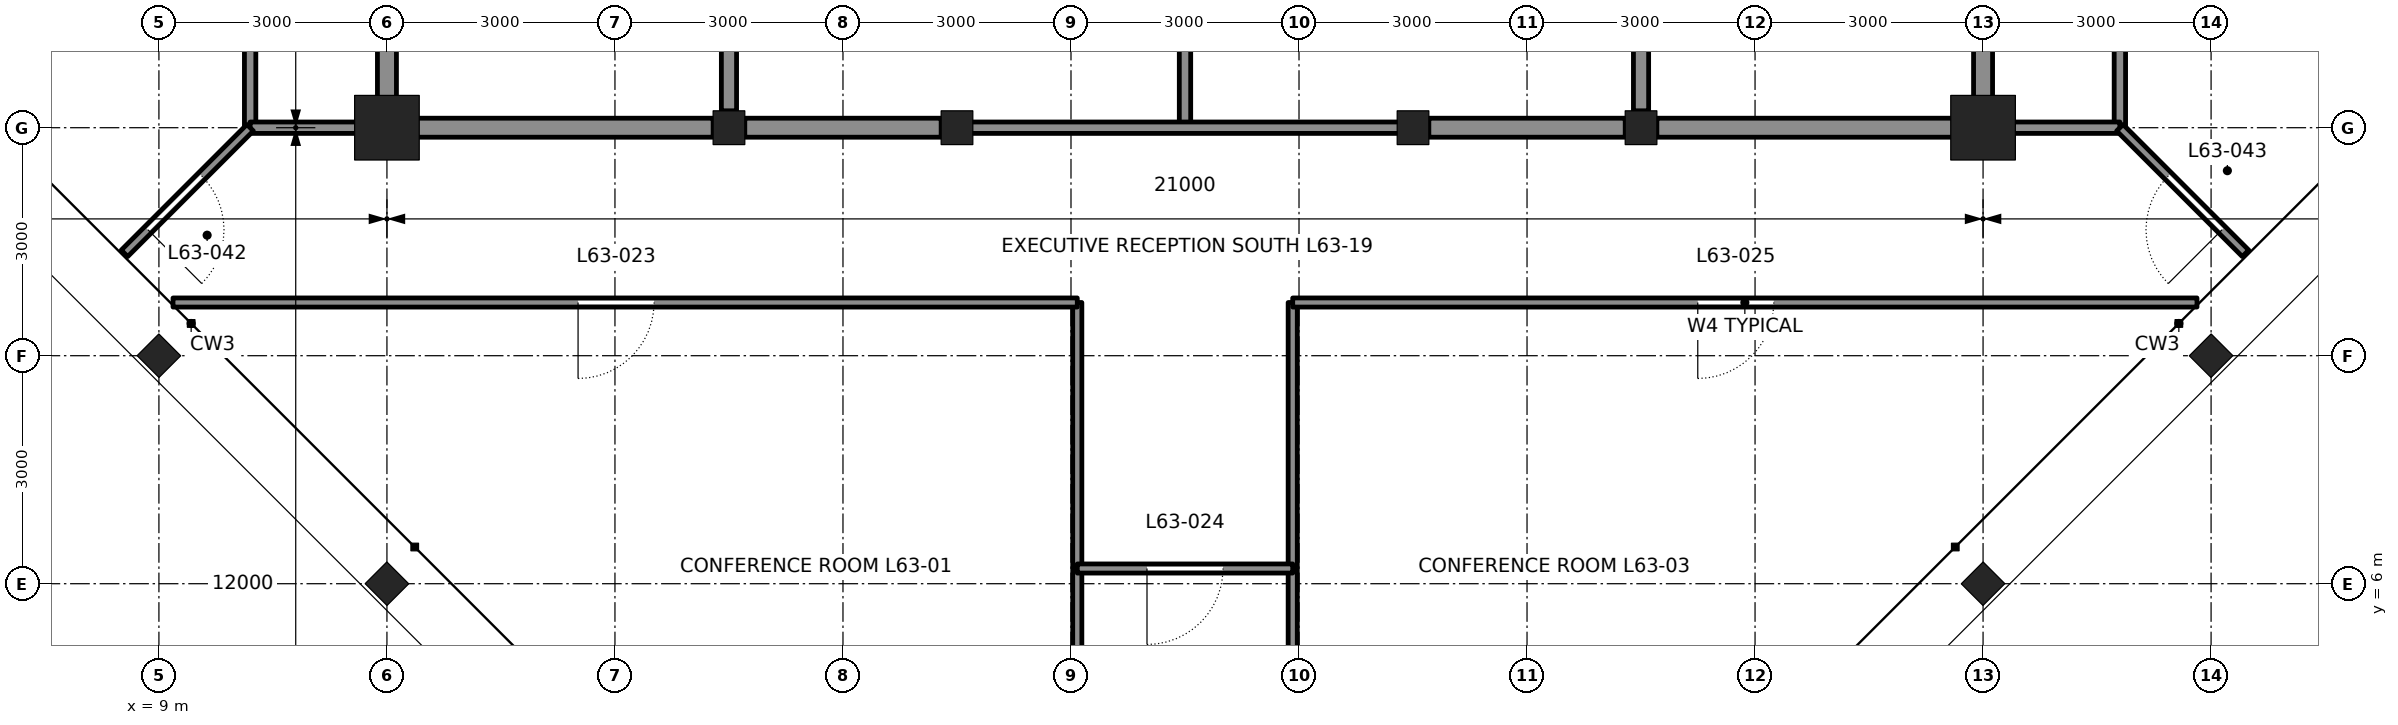
"""IFC4 building model, lengths in metres.
Left out: names, types, materials, properties, quantities, classifications, styles, units other than length and angle.
Written with IfcOpenShell. Run it as: python <this file> out.ifc"""

import sys

from ifc_helpers import new_model, si_unit, direction, frame, frame_2d, origin, origin_2d, place, context, subcontext, project, spatial, rectangle, hollow_rectangle, i_section, extrude, element, fill, save


model = new_model("IFC4")
c1 = context("Model", 3, precision=1e-05, world=origin(), true_north=direction((0.0, 1.0)))
c2 = subcontext(c1, "Body", "Model", "MODEL_VIEW")
j1 = project(units=[si_unit("LENGTHUNIT", "METRE"), si_unit("PLANEANGLEUNIT", "RADIAN")], contexts=[c1])
p1 = place(None, origin())
s1 = spatial("IfcSite", under=j1, at=p1, CompositionType="ELEMENT")
p2 = place(p1, origin())
s2 = spatial("IfcBuilding", under=s1, at=p2, CompositionType="ELEMENT")
p3 = place(p2, frame((0.0, 0.0, 283.2)))
s3 = spatial("IfcBuildingStorey", under=s2, at=p3, CompositionType="ELEMENT", Elevation=283.2)
for number, where, z_axis, x_axis in (
    (1, (33.0, 6.0, 0.0), (0.0, 0.0, 1.0), (0.707, -0.707, 0.0)),
    (2, (36.0, 9.0, 0.0), (0.0, 0.0, 1.0), (0.707, -0.707, 0.0)),
    (3, (9.0, 9.0, 0.0), (0.0, 0.0, 1.0), (-0.707, -0.707, 0.0)),
    (4, (12.0, 6.0, 0.0), (0.0, 0.0, 1.0), (-0.707, -0.707, 0.0)),
):
    element("IfcColumn", number, at=place(p3, frame(where, z_axis=z_axis, x_axis=x_axis)), inside=s3, PredefinedType="COLUMN", context=c2, shape_type="SweptSolid", body=[
        extrude(i_section(OverallWidth=0.404, OverallDepth=0.406, WebThickness=0.027, FlangeThickness=0.044, at=origin_2d()), origin(), (0.0, 0.0, 1.0), 4.2),
    ])
p4 = place(p3, frame((12.0, 12.0, 0.0), z_axis=(0.0, 0.0, 1.0), x_axis=(1.0, 0.0, 0.0)))
e5 = element("IfcColumn", 5, at=p4, inside=s3, PredefinedType="COLUMN", context=c2, shape_type="SweptSolid", body=[
    extrude(hollow_rectangle(XDim=0.85, YDim=0.85, WallThickness=0.085, at=origin_2d()), origin(), (0.0, 0.0, 1.0), 4.2),
])
for number, where, z_axis, x_axis in (
    (6, (16.5, 12.0, 0.0), (0.0, 0.0, 1.0), (1.0, 0.0, 0.0)),
    (7, (19.5, 12.0, 0.0), (0.0, 0.0, 1.0), (1.0, 0.0, 0.0)),
    (8, (25.5, 12.0, 0.0), (0.0, 0.0, 1.0), (1.0, 0.0, 0.0)),
    (9, (28.5, 12.0, 0.0), (0.0, 0.0, 1.0), (1.0, 0.0, 0.0)),
):
    element("IfcColumn", number, at=place(p3, frame(where, z_axis=z_axis, x_axis=x_axis)), inside=s3, PredefinedType="COLUMN", context=c2, shape_type="SweptSolid", body=[
        extrude(i_section(OverallWidth=0.417, OverallDepth=0.445, WebThickness=0.039, FlangeThickness=0.063, at=origin_2d()), origin(), (0.0, 0.0, 1.0), 4.2),
    ])
p5 = place(p3, frame((33.0, 12.0, 0.0), z_axis=(0.0, 0.0, 1.0), x_axis=(1.0, 0.0, 0.0)))
e10 = element("IfcColumn", 10, at=p5, inside=s3, PredefinedType="COLUMN", context=c2, shape_type="SweptSolid", body=[
    extrude(hollow_rectangle(XDim=0.85, YDim=0.85, WallThickness=0.085, at=origin_2d()), origin(), (0.0, 0.0, 1.0), 4.2),
])
p6 = place(p3, frame((12.0, 12.25, 0.0), z_axis=(0.0, 0.0, 1.0), x_axis=(0.0, 1.0, 0.0)))
e11 = element("IfcWall", 11, at=p6, inside=s3, PredefinedType="SOLIDWALL", context=c2, shape_type="SweptSolid", body=[
    extrude(rectangle(XDim=8.528, YDim=0.25, at=frame_2d((4.264, 0.0))), origin(), (0.0, 0.0, 1.0), 3.113),
])
p7 = place(p6, frame((0.875, 0.0, 0.0)))
e12 = element("IfcOpeningElement", 12, at=p7, cuts=e11, PredefinedType="OPENING", context=c2, shape_type="SweptSolid", body=[
    extrude(rectangle(XDim=0.75, YDim=2.1, at=frame_2d((0.375, 1.05))), frame((0.0, 0.135, 0.0), z_axis=(0.0, -1.0, 0.0), x_axis=(1.0, 0.0, 0.0)), (0.0, 0.0, 1.0), 0.27),
])
p8 = place(p3, frame((12.25, 12.0, 0.0), z_axis=(0.0, 0.0, 1.0), x_axis=(1.0, 0.0, 0.0)))
e13 = element("IfcWall", 13, at=p8, inside=s3, PredefinedType="SOLIDWALL", context=c2, shape_type="SweptSolid", body=[
    extrude(rectangle(XDim=4.042, YDim=0.25, at=frame_2d((2.021, 0.0))), origin(), (0.0, 0.0, 1.0), 3.182),
])
for number, where, z_axis, x_axis in (
    (14, (16.708, 12.0, 0.0), (0.0, 0.0, 1.0), (1.0, 0.0, 0.0)),
    (15, (25.708, 12.0, 0.0), (0.0, 0.0, 1.0), (1.0, 0.0, 0.0)),
):
    element("IfcWall", number, at=place(p3, frame(where, z_axis=z_axis, x_axis=x_axis)), inside=s3, PredefinedType="SOLIDWALL", context=c2, shape_type="SweptSolid", body=[
        extrude(rectangle(XDim=2.583, YDim=0.25, at=frame_2d((1.292, 0.0))), origin(), (0.0, 0.0, 1.0), 3.182),
    ])
p9 = place(p3, frame((28.708, 12.0, 0.0), z_axis=(0.0, 0.0, 1.0), x_axis=(1.0, 0.0, 0.0)))
e16 = element("IfcWall", 16, at=p9, inside=s3, PredefinedType="SOLIDWALL", context=c2, shape_type="SweptSolid", body=[
    extrude(rectangle(XDim=4.042, YDim=0.25, at=frame_2d((2.021, 0.0))), origin(), (0.0, 0.0, 1.0), 3.182),
])
for number, where, z_axis, x_axis in (
    (17, (16.5, 12.222, 0.0), (0.0, 0.0, 1.0), (0.0, 1.0, 0.0)),
    (18, (28.5, 12.222, 0.0), (0.0, 0.0, 1.0), (0.0, 1.0, 0.0)),
):
    element("IfcWall", number, at=place(p3, frame(where, z_axis=z_axis, x_axis=x_axis)), inside=s3, PredefinedType="SOLIDWALL", context=c2, shape_type="SweptSolid", body=[
        extrude(rectangle(XDim=8.555, YDim=0.2, at=frame_2d((4.278, 0.0))), origin(), (0.0, 0.0, 1.0), 3.113),
    ])
p10 = place(p3, frame((33.0, 12.25, 0.0), z_axis=(0.0, 0.0, 1.0), x_axis=(0.0, 1.0, 0.0)))
e19 = element("IfcWall", 19, at=p10, inside=s3, PredefinedType="SOLIDWALL", context=c2, shape_type="SweptSolid", body=[
    extrude(rectangle(XDim=8.528, YDim=0.25, at=frame_2d((4.264, 0.0))), origin(), (0.0, 0.0, 1.0), 3.113),
])
p11 = place(p10, frame((6.65, 0.0, 0.0)))
e20 = element("IfcOpeningElement", 20, at=p11, cuts=e19, PredefinedType="OPENING", context=c2, shape_type="SweptSolid", body=[
    extrude(rectangle(XDim=1.2, YDim=2.1, at=frame_2d((0.6, 1.05))), frame((0.0, 0.135, 0.0), z_axis=(0.0, -1.0, 0.0), x_axis=(1.0, 0.0, 0.0)), (0.0, 0.0, 1.0), 0.27),
])
p12 = place(p10, frame((0.875, 0.0, 0.0)))
e21 = element("IfcOpeningElement", 21, at=p12, cuts=e19, PredefinedType="OPENING", context=c2, shape_type="SweptSolid", body=[
    extrude(rectangle(XDim=0.75, YDim=2.1, at=frame_2d((0.375, 1.05))), frame((0.0, 0.135, 0.0), z_axis=(0.0, -1.0, 0.0), x_axis=(1.0, 0.0, 0.0)), (0.0, 0.0, 1.0), 0.27),
])
p13 = place(p3, frame((22.5, 15.0, 0.0), z_axis=(0.0, 0.0, 1.0), x_axis=(0.0, -1.0, 0.0)))
e22 = element("IfcWall", 22, at=p13, inside=s3, PredefinedType="PARTITIONING", context=c2, shape_type="SweptSolid", body=[
    extrude(rectangle(XDim=3.0, YDim=0.15, at=frame_2d((1.5, 0.0))), origin(), (0.0, 0.0, 1.0), 4.04),
])
p14 = place(p3, frame((19.5, 12.0, 0.0), z_axis=(0.0, 0.0, 1.0), x_axis=(1.0, 0.0, 0.0)))
e23 = element("IfcWall", 23, at=p14, inside=s3, PredefinedType="PARTITIONING", context=c2, shape_type="SweptSolid", body=[
    extrude(rectangle(XDim=6.0, YDim=0.15, at=frame_2d((3.0, 0.0))), origin(), (0.0, 0.0, 1.0), 3.182),
])
for number, where, z_axis, x_axis in (
    (24, (21.083, 0.653, 0.0), (0.0, 0.0, 1.0), (0.0, 1.0, 0.0)),
    (25, (23.917, 0.653, 0.0), (0.0, 0.0, 1.0), (0.0, 1.0, 0.0)),
):
    element("IfcWall", number, at=place(p3, frame(where, z_axis=z_axis, x_axis=x_axis)), inside=s3, PredefinedType="PARTITIONING", context=c2, shape_type="SweptSolid", body=[
        extrude(rectangle(XDim=9.047, YDim=0.12, at=frame_2d((4.524, 0.0))), origin(), (0.0, 0.0, 1.0), 3.357),
    ])
p15 = place(p3, frame((9.186, 9.7, 0.0), z_axis=(0.0, 0.0, 1.0), x_axis=(1.0, 0.0, 0.0)))
e26 = element("IfcWall", 26, at=p15, inside=s3, PredefinedType="PARTITIONING", context=c2, shape_type="SweptSolid", body=[
    extrude(rectangle(XDim=11.897, YDim=0.12, at=frame_2d((5.949, 0.0))), origin(), (0.0, 0.0, 1.0), 4.04),
])
p16 = place(p15, frame((5.329, 0.0, 0.0)))
e27 = element("IfcOpeningElement", 27, at=p16, cuts=e26, PredefinedType="OPENING", context=c2, shape_type="SweptSolid", body=[
    extrude(rectangle(XDim=1.0, YDim=2.4, at=frame_2d((0.5, 1.2))), frame((0.0, 0.07, 0.0), z_axis=(0.0, -1.0, 0.0), x_axis=(1.0, 0.0, 0.0)), (0.0, 0.0, 1.0), 0.14),
])
p17 = place(p3, frame((21.083, 6.2, 0.0), z_axis=(0.0, 0.0, 1.0), x_axis=(1.0, 0.0, 0.0)))
e28 = element("IfcWall", 28, at=p17, inside=s3, PredefinedType="PARTITIONING", context=c2, shape_type="SweptSolid", body=[
    extrude(rectangle(XDim=2.834, YDim=0.12, at=frame_2d((1.417, 0.0))), origin(), (0.0, 0.0, 1.0), 4.04),
])
p18 = place(p17, frame((0.917, 0.0, 0.0)))
e29 = element("IfcOpeningElement", 29, at=p18, cuts=e28, PredefinedType="OPENING", context=c2, shape_type="SweptSolid", body=[
    extrude(rectangle(XDim=1.0, YDim=2.4, at=frame_2d((0.5, 1.2))), frame((0.0, 0.07, 0.0), z_axis=(0.0, -1.0, 0.0), x_axis=(1.0, 0.0, 0.0)), (0.0, 0.0, 1.0), 0.14),
])
p19 = place(p3, frame((23.917, 9.7, 0.0), z_axis=(0.0, 0.0, 1.0), x_axis=(1.0, 0.0, 0.0)))
e30 = element("IfcWall", 30, at=p19, inside=s3, PredefinedType="PARTITIONING", context=c2, shape_type="SweptSolid", body=[
    extrude(rectangle(XDim=11.897, YDim=0.12, at=frame_2d((5.949, 0.0))), origin(), (0.0, 0.0, 1.0), 4.04),
])
p20 = place(p19, frame((5.329, 0.0, 0.0)))
e31 = element("IfcOpeningElement", 31, at=p20, cuts=e30, PredefinedType="OPENING", context=c2, shape_type="SweptSolid", body=[
    extrude(rectangle(XDim=1.0, YDim=2.4, at=frame_2d((0.5, 1.2))), frame((0.0, 0.07, 0.0), z_axis=(0.0, -1.0, 0.0), x_axis=(1.0, 0.0, 0.0)), (0.0, 0.0, 1.0), 0.14),
])
p21 = place(p3, frame((10.2, 12.0, 0.0), z_axis=(0.0, 0.0, 1.0), x_axis=(0.0, 1.0, 0.0)))
e32 = element("IfcWall", 32, at=p21, inside=s3, PredefinedType="PARTITIONING", context=c2, shape_type="SweptSolid", body=[
    extrude(rectangle(XDim=24.314, YDim=0.15, at=frame_2d((12.157, 0.0))), origin(), (0.0, 0.0, 1.0), 4.04),
])
p22 = place(p21, frame((11.5, 0.0, 0.0)))
e33 = element("IfcOpeningElement", 33, at=p22, cuts=e32, PredefinedType="OPENING", context=c2, shape_type="SweptSolid", body=[
    extrude(rectangle(XDim=1.0, YDim=2.4, at=frame_2d((0.5, 1.2))), frame((0.0, 0.085, 0.0), z_axis=(0.0, -1.0, 0.0), x_axis=(1.0, 0.0, 0.0)), (0.0, 0.0, 1.0), 0.17),
])
p23 = place(p3, frame((10.2, 12.0, 0.0), z_axis=(0.0, 0.0, 1.0), x_axis=(1.0, 0.0, 0.0)))
e34 = element("IfcWall", 34, at=p23, inside=s3, PredefinedType="PARTITIONING", context=c2, shape_type="SweptSolid", body=[
    extrude(rectangle(XDim=1.8, YDim=0.15, at=frame_2d((0.9, 0.0))), origin(), (0.0, 0.0, 1.0), 3.271),
])
p24 = place(p3, frame((34.8, 12.0, 0.0), z_axis=(0.0, 0.0, 1.0), x_axis=(0.0, 1.0, 0.0)))
e35 = element("IfcWall", 35, at=p24, inside=s3, PredefinedType="PARTITIONING", context=c2, shape_type="SweptSolid", body=[
    extrude(rectangle(XDim=24.314, YDim=0.15, at=frame_2d((12.157, 0.0))), origin(), (0.0, 0.0, 1.0), 4.04),
])
p25 = place(p24, frame((11.5, 0.0, 0.0)))
e36 = element("IfcOpeningElement", 36, at=p25, cuts=e35, PredefinedType="OPENING", context=c2, shape_type="SweptSolid", body=[
    extrude(rectangle(XDim=1.0, YDim=2.4, at=frame_2d((0.5, 1.2))), frame((0.0, 0.085, 0.0), z_axis=(0.0, -1.0, 0.0), x_axis=(1.0, 0.0, 0.0)), (0.0, 0.0, 1.0), 0.17),
])
p26 = place(p3, frame((33.0, 12.0, 0.0), z_axis=(0.0, 0.0, 1.0), x_axis=(1.0, 0.0, 0.0)))
e37 = element("IfcWall", 37, at=p26, inside=s3, PredefinedType="PARTITIONING", context=c2, shape_type="SweptSolid", body=[
    extrude(rectangle(XDim=1.8, YDim=0.15, at=frame_2d((0.9, 0.0))), origin(), (0.0, 0.0, 1.0), 3.271),
])
p27 = place(p3, frame((10.2, 12.0, 0.0), z_axis=(0.0, 0.0, 1.0), x_axis=(-0.707106781187, -0.707106781187, 0.0)))
e38 = element("IfcWall", 38, at=p27, inside=s3, PredefinedType="PARTITIONING", context=c2, shape_type="SweptSolid", body=[
    extrude(rectangle(XDim=2.338, YDim=0.12, at=frame_2d((1.169, 0.0))), origin(), (0.0, 0.0, 1.0), 4.04),
])
p28 = place(p27, frame((0.9, 0.0, 0.0)))
e39 = element("IfcOpeningElement", 39, at=p28, cuts=e38, PredefinedType="OPENING", context=c2, shape_type="SweptSolid", body=[
    extrude(rectangle(XDim=1.0, YDim=2.4, at=frame_2d((0.5, 1.2))), frame((0.0, 0.07, 0.0), z_axis=(0.0, -1.0, 0.0), x_axis=(1.0, 0.0, 0.0)), (0.0, 0.0, 1.0), 0.14),
])
p29 = place(p3, frame((34.8, 12.0, 0.0), z_axis=(0.0, 0.0, 1.0), x_axis=(0.707106781187, -0.707106781187, 0.0)))
e40 = element("IfcWall", 40, at=p29, inside=s3, PredefinedType="PARTITIONING", context=c2, shape_type="SweptSolid", body=[
    extrude(rectangle(XDim=2.338, YDim=0.12, at=frame_2d((1.169, 0.0))), origin(), (0.0, 0.0, 1.0), 4.04),
])
p30 = place(p29, frame((0.9, 0.0, 0.0)))
e41 = element("IfcOpeningElement", 41, at=p30, cuts=e40, PredefinedType="OPENING", context=c2, shape_type="SweptSolid", body=[
    extrude(rectangle(XDim=1.0, YDim=2.4, at=frame_2d((0.5, 1.2))), frame((0.0, 0.07, 0.0), z_axis=(0.0, -1.0, 0.0), x_axis=(1.0, 0.0, 0.0)), (0.0, 0.0, 1.0), 0.14),
])
p31 = place(p16, frame((1.0, 0.0, 0.0), z_axis=(0.0, 0.0, 1.0), x_axis=(-1.0, 0.0, 0.0)))
e42 = element("IfcDoor", 42, at=p31, inside=s3, OperationType="SINGLE_SWING_RIGHT", PredefinedType="DOOR", context=c2, shape_type="SweptSolid", body=[
    extrude(rectangle(XDim=1.0, YDim=2.4, at=frame_2d((0.5, 1.2))), frame((0.0, 0.025, 0.0), z_axis=(0.0, -1.0, 0.0), x_axis=(1.0, 0.0, 0.0)), (0.0, 0.0, 1.0), 0.05),
])
fill(e27, e42)
p32 = place(p18, frame((1.0, 0.0, 0.0), z_axis=(0.0, 0.0, 1.0), x_axis=(-1.0, 0.0, 0.0)))
e43 = element("IfcDoor", 43, at=p32, inside=s3, OperationType="SINGLE_SWING_RIGHT", PredefinedType="DOOR", context=c2, shape_type="SweptSolid", body=[
    extrude(rectangle(XDim=1.0, YDim=2.4, at=frame_2d((0.5, 1.2))), frame((0.0, 0.025, 0.0), z_axis=(0.0, -1.0, 0.0), x_axis=(1.0, 0.0, 0.0)), (0.0, 0.0, 1.0), 0.05),
])
fill(e29, e43)
p33 = place(p20, frame((1.0, 0.0, 0.0), z_axis=(0.0, 0.0, 1.0), x_axis=(-1.0, 0.0, 0.0)))
e44 = element("IfcDoor", 44, at=p33, inside=s3, OperationType="SINGLE_SWING_RIGHT", PredefinedType="DOOR", context=c2, shape_type="SweptSolid", body=[
    extrude(rectangle(XDim=1.0, YDim=2.4, at=frame_2d((0.5, 1.2))), frame((0.0, 0.025, 0.0), z_axis=(0.0, -1.0, 0.0), x_axis=(1.0, 0.0, 0.0)), (0.0, 0.0, 1.0), 0.05),
])
fill(e31, e44)
p34 = place(p28, origin())
e45 = element("IfcDoor", 45, at=p34, inside=s3, OperationType="SINGLE_SWING_RIGHT", PredefinedType="DOOR", context=c2, shape_type="SweptSolid", body=[
    extrude(rectangle(XDim=1.0, YDim=2.4, at=frame_2d((0.5, 1.2))), frame((0.0, 0.025, 0.0), z_axis=(0.0, -1.0, 0.0), x_axis=(1.0, 0.0, 0.0)), (0.0, 0.0, 1.0), 0.05),
])
fill(e39, e45)
p35 = place(p30, frame((1.0, 0.0, 0.0), z_axis=(0.0, 0.0, 1.0), x_axis=(-1.0, 0.0, 0.0)))
e46 = element("IfcDoor", 46, at=p35, inside=s3, OperationType="SINGLE_SWING_LEFT", PredefinedType="DOOR", context=c2, shape_type="SweptSolid", body=[
    extrude(rectangle(XDim=1.0, YDim=2.4, at=frame_2d((0.5, 1.2))), frame((0.0, 0.025, 0.0), z_axis=(0.0, -1.0, 0.0), x_axis=(1.0, 0.0, 0.0)), (0.0, 0.0, 1.0), 0.05),
])
fill(e41, e46)
save(model, sys.argv[1])
